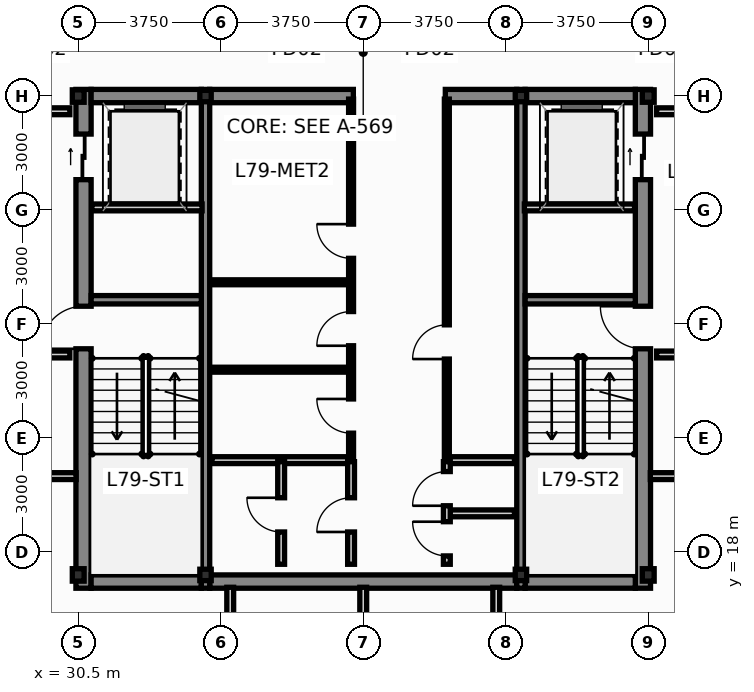
"""IFC4 building model, lengths in metres.
Left out: names, types, materials, properties, quantities, classifications, styles, units other than length and angle.
Written with IfcOpenShell. Run it as: python <this file> out.ifc"""

import sys

from ifc_helpers import new_model, si_unit, direction, frame, frame_2d, origin, origin_2d, place, context, subcontext, project, spatial, rectangle, hollow_rectangle, i_section, extrude, source, transform, mapped, element, fill, save


model = new_model("IFC4")
c1 = context("Model", 3, precision=1e-05, world=origin(), true_north=direction((0.0, 1.0)))
c2 = subcontext(c1, "Body", "Model", "MODEL_VIEW")
j1 = project(units=[si_unit("LENGTHUNIT", "METRE"), si_unit("PLANEANGLEUNIT", "RADIAN")], contexts=[c1])
p1 = place(None, origin())
s1 = spatial("IfcSite", under=j1, at=p1, CompositionType="ELEMENT")
p2 = place(p1, origin())
s2 = spatial("IfcBuilding", under=s1, at=p2, CompositionType="ELEMENT")
p3 = place(p2, frame((0.0, 0.0, 300.0)))
s3 = spatial("IfcBuildingStorey", under=s2, at=p3, CompositionType="ELEMENT", Elevation=300.0)
m1 = source(origin(), c2, "Body", "SweptSolid", [
    extrude(i_section(OverallWidth=0.311, OverallDepth=0.327, WebThickness=0.016, FlangeThickness=0.025, at=origin_2d()), origin(), (0.0, 0.0, 1.0), 3.4),
])
for number, where, z_axis, x_axis in (
    (1, (30.5, 17.4, 0.0), (0.0, 0.0, 1.0), (1.0, 0.0, 0.0)),
    (2, (45.5, 17.4, 0.0), (0.0, 0.0, 1.0), (1.0, 0.0, 0.0)),
    (3, (45.5, 30.0, 0.0), (0.0, 0.0, 1.0), (1.0, 0.0, 0.0)),
    (4, (30.5, 30.0, 0.0), (0.0, 0.0, 1.0), (1.0, 0.0, 0.0)),
):
    element("IfcColumn", number, at=place(p3, frame(where, z_axis=z_axis, x_axis=x_axis)), inside=s3, PredefinedType="COLUMN", context=c2, shape_type="MappedRepresentation", body=[
        mapped(m1, transform((0.0, 0.0, 0.0), scale=1.0)),
    ])
m2 = source(origin(), c2, "Body", "SweptSolid", [
    extrude(hollow_rectangle(XDim=0.3, YDim=0.3, WallThickness=0.012, at=origin_2d()), origin(), (0.0, 0.0, 1.0), 3.4),
])
for number, where, z_axis, x_axis in (
    (5, (33.85, 17.4, 0.0), (0.0, 0.0, 1.0), (1.0, 0.0, 0.0)),
    (6, (42.15, 17.4, 0.0), (0.0, 0.0, 1.0), (1.0, 0.0, 0.0)),
    (7, (33.85, 30.0, 0.0), (0.0, 0.0, 1.0), (1.0, 0.0, 0.0)),
    (8, (42.15, 30.0, 0.0), (0.0, 0.0, 1.0), (1.0, 0.0, 0.0)),
):
    element("IfcColumn", number, at=place(p3, frame(where, z_axis=z_axis, x_axis=x_axis)), inside=s3, PredefinedType="COLUMN", context=c2, shape_type="MappedRepresentation", body=[
        mapped(m2, transform((0.0, 0.0, 0.0), scale=1.0)),
    ])
p4 = place(p3, frame((30.64, 17.05, 0.0), z_axis=(0.0, 0.0, 1.0), x_axis=(0.0, 1.0, 0.0)))
e9 = element("IfcWall", 9, at=p4, inside=s3, PredefinedType="SHEAR", context=c2, shape_type="SweptSolid", body=[
    extrude(rectangle(XDim=13.125, YDim=0.4, at=frame_2d((6.562, 0.0))), origin(), (0.0, 0.0, 1.0), 3.4),
])
p5 = place(p4, frame((6.3, 0.0, 0.0)))
e10 = element("IfcOpeningElement", 10, at=p5, cuts=e9, PredefinedType="OPENING", context=c2, shape_type="SweptSolid", body=[
    extrude(rectangle(XDim=1.12, YDim=2.15, at=frame_2d((0.56, 1.075))), frame((0.0, 0.212, 0.0), z_axis=(0.0, -1.0, 0.0), x_axis=(1.0, 0.0, 0.0)), (0.0, 0.0, 1.0), 0.424),
])
p6 = place(p4, frame((10.75, 0.0, 0.0)))
e11 = element("IfcOpeningElement", 11, at=p6, cuts=e9, PredefinedType="OPENING", context=c2, shape_type="SweptSolid", body=[
    extrude(rectangle(XDim=1.2, YDim=2.2, at=frame_2d((0.6, 1.1))), frame((0.0, 0.212, 0.0), z_axis=(0.0, -1.0, 0.0), x_axis=(1.0, 0.0, 0.0)), (0.0, 0.0, 1.0), 0.424),
])
p7 = place(p3, frame((45.36, 17.05, 0.0), z_axis=(0.0, 0.0, 1.0), x_axis=(0.0, 1.0, 0.0)))
e12 = element("IfcWall", 12, at=p7, inside=s3, PredefinedType="SHEAR", context=c2, shape_type="SweptSolid", body=[
    extrude(rectangle(XDim=13.125, YDim=0.4, at=frame_2d((6.562, 0.0))), origin(), (0.0, 0.0, 1.0), 3.4),
])
p8 = place(p7, frame((6.3, 0.0, 0.0)))
e13 = element("IfcOpeningElement", 13, at=p8, cuts=e12, PredefinedType="OPENING", context=c2, shape_type="SweptSolid", body=[
    extrude(rectangle(XDim=1.12, YDim=2.15, at=frame_2d((0.56, 1.075))), frame((0.0, 0.212, 0.0), z_axis=(0.0, -1.0, 0.0), x_axis=(1.0, 0.0, 0.0)), (0.0, 0.0, 1.0), 0.424),
])
p9 = place(p7, frame((10.75, 0.0, 0.0)))
e14 = element("IfcOpeningElement", 14, at=p9, cuts=e12, PredefinedType="OPENING", context=c2, shape_type="SweptSolid", body=[
    extrude(rectangle(XDim=1.2, YDim=2.2, at=frame_2d((0.6, 1.1))), frame((0.0, 0.212, 0.0), z_axis=(0.0, -1.0, 0.0), x_axis=(1.0, 0.0, 0.0)), (0.0, 0.0, 1.0), 0.424),
])
p10 = place(p3, frame((30.84, 17.225, 0.0), z_axis=(0.0, 0.0, 1.0), x_axis=(1.0, 0.0, 0.0)))
e15 = element("IfcWall", 15, at=p10, inside=s3, PredefinedType="SHEAR", context=c2, shape_type="SweptSolid", body=[
    extrude(rectangle(XDim=2.9, YDim=0.35, at=frame_2d((1.45, 0.0))), origin(), (0.0, 0.0, 1.0), 3.4),
])
p11 = place(p3, frame((33.96, 17.225, 0.0), z_axis=(0.0, 0.0, 1.0), x_axis=(1.0, 0.0, 0.0)))
e16 = element("IfcWall", 16, at=p11, inside=s3, PredefinedType="SHEAR", context=c2, shape_type="SweptSolid", body=[
    extrude(rectangle(XDim=8.08, YDim=0.35, at=frame_2d((4.04, 0.0))), origin(), (0.0, 0.0, 1.0), 3.4),
])
for number, where, z_axis, x_axis in (
    (17, (42.26, 17.225, 0.0), (0.0, 0.0, 1.0), (1.0, 0.0, 0.0)),
    (18, (30.84, 30.0, 0.0), (0.0, 0.0, 1.0), (1.0, 0.0, 0.0)),
):
    element("IfcWall", number, at=place(p3, frame(where, z_axis=z_axis, x_axis=x_axis)), inside=s3, PredefinedType="SHEAR", context=c2, shape_type="SweptSolid", body=[
        extrude(rectangle(XDim=2.9, YDim=0.35, at=frame_2d((1.45, 0.0))), origin(), (0.0, 0.0, 1.0), 3.4),
    ])
p12 = place(p3, frame((33.96, 30.0, 0.0), z_axis=(0.0, 0.0, 1.0), x_axis=(1.0, 0.0, 0.0)))
e19 = element("IfcWall", 19, at=p12, inside=s3, PredefinedType="SHEAR", context=c2, shape_type="SweptSolid", body=[
    extrude(rectangle(XDim=3.78, YDim=0.35, at=frame_2d((1.89, 0.0))), origin(), (0.0, 0.0, 1.0), 3.4),
])
p13 = place(p3, frame((40.16, 30.0, 0.0), z_axis=(0.0, 0.0, 1.0), x_axis=(1.0, 0.0, 0.0)))
e20 = element("IfcWall", 20, at=p13, inside=s3, PredefinedType="SHEAR", context=c2, shape_type="SweptSolid", body=[
    extrude(rectangle(XDim=1.88, YDim=0.35, at=frame_2d((0.94, 0.0))), origin(), (0.0, 0.0, 1.0), 3.4),
])
p14 = place(p3, frame((42.26, 30.0, 0.0), z_axis=(0.0, 0.0, 1.0), x_axis=(1.0, 0.0, 0.0)))
e21 = element("IfcWall", 21, at=p14, inside=s3, PredefinedType="SHEAR", context=c2, shape_type="SweptSolid", body=[
    extrude(rectangle(XDim=2.9, YDim=0.35, at=frame_2d((1.45, 0.0))), origin(), (0.0, 0.0, 1.0), 3.4),
])
for number, where, z_axis, x_axis in (
    (22, (33.85, 17.05, 0.0), (0.0, 0.0, 1.0), (0.0, 1.0, 0.0)),
    (23, (42.15, 17.05, 0.0), (0.0, 0.0, 1.0), (0.0, 1.0, 0.0)),
):
    element("IfcWall", number, at=place(p3, frame(where, z_axis=z_axis, x_axis=x_axis)), inside=s3, PredefinedType="SHEAR", context=c2, shape_type="SweptSolid", body=[
        extrude(rectangle(XDim=13.125, YDim=0.22, at=frame_2d((6.562, 0.0))), origin(), (0.0, 0.0, 1.0), 3.4),
    ])
for number, where, z_axis, x_axis in (
    (24, (30.84, 24.64, 0.0), (0.0, 0.0, 1.0), (1.0, 0.0, 0.0)),
    (25, (42.26, 24.64, 0.0), (0.0, 0.0, 1.0), (1.0, 0.0, 0.0)),
):
    element("IfcWall", number, at=place(p3, frame(where, z_axis=z_axis, x_axis=x_axis)), inside=s3, PredefinedType="SHEAR", context=c2, shape_type="SweptSolid", body=[
        extrude(rectangle(XDim=2.9, YDim=0.22, at=frame_2d((1.45, 0.0))), origin(), (0.0, 0.0, 1.0), 3.4),
    ])
for number, where, z_axis, x_axis in (
    (26, (27.52, 23.2, 0.0), (0.0, 0.0, 1.0), (1.0, 0.0, 0.0)),
    (27, (27.52, 29.6, 0.0), (0.0, 0.0, 1.0), (1.0, 0.0, 0.0)),
    (28, (45.72, 23.2, 0.0), (0.0, 0.0, 1.0), (1.0, 0.0, 0.0)),
    (29, (45.72, 29.6, 0.0), (0.0, 0.0, 1.0), (1.0, 0.0, 0.0)),
):
    element("IfcWall", number, at=place(p3, frame(where, z_axis=z_axis, x_axis=x_axis)), inside=s3, PredefinedType="PARTITIONING", context=c2, shape_type="SweptSolid", body=[
        extrude(rectangle(XDim=2.76, YDim=0.18, at=frame_2d((1.38, 0.0))), origin(), (0.0, 0.0, 1.0), 3.15),
    ])
for number, where, z_axis, x_axis in (
    (30, (30.86, 27.07, 0.0), (0.0, 0.0, 1.0), (1.0, 0.0, 0.0)),
    (31, (42.24, 27.07, 0.0), (0.0, 0.0, 1.0), (1.0, 0.0, 0.0)),
):
    element("IfcWall", number, at=place(p3, frame(where, z_axis=z_axis, x_axis=x_axis)), inside=s3, PredefinedType="PARTITIONING", context=c2, shape_type="SweptSolid", body=[
        extrude(rectangle(XDim=2.9, YDim=0.18, at=frame_2d((1.45, 0.0))), origin(), (0.0, 0.0, 1.0), 3.15),
    ])
p15 = place(p3, frame((34.02, 20.42, 0.0), z_axis=(0.0, 0.0, 1.0), x_axis=(1.0, 0.0, 0.0)))
e32 = element("IfcWall", 32, at=p15, inside=s3, PredefinedType="PARTITIONING", context=c2, shape_type="SweptSolid", body=[
    extrude(rectangle(XDim=3.64, YDim=0.18, at=frame_2d((1.82, 0.0))), origin(), (0.0, 0.0, 1.0), 3.15),
])
p16 = place(p3, frame((40.22, 20.42, 0.0), z_axis=(0.0, 0.0, 1.0), x_axis=(1.0, 0.0, 0.0)))
e33 = element("IfcWall", 33, at=p16, inside=s3, PredefinedType="PARTITIONING", context=c2, shape_type="SweptSolid", body=[
    extrude(rectangle(XDim=1.76, YDim=0.18, at=frame_2d((0.88, 0.0))), origin(), (0.0, 0.0, 1.0), 3.15),
])
for number, where, z_axis, x_axis in (
    (34, (34.02, 22.8, 0.0), (0.0, 0.0, 1.0), (1.0, 0.0, 0.0)),
    (35, (34.02, 25.1, 0.0), (0.0, 0.0, 1.0), (1.0, 0.0, 0.0)),
):
    element("IfcWall", number, at=place(p3, frame(where, z_axis=z_axis, x_axis=x_axis)), inside=s3, PredefinedType="PARTITIONING", context=c2, shape_type="SweptSolid", body=[
        extrude(rectangle(XDim=3.58, YDim=0.13, at=frame_2d((1.79, 0.0))), origin(), (0.0, 0.0, 1.0), 3.15),
    ])
p17 = place(p3, frame((37.68, 20.48, 0.0), z_axis=(0.0, 0.0, 1.0), x_axis=(0.0, 1.0, 0.0)))
e36 = element("IfcWall", 36, at=p17, inside=s3, PredefinedType="PARTITIONING", context=c2, shape_type="SweptSolid", body=[
    extrude(rectangle(XDim=9.44, YDim=0.13, at=frame_2d((4.72, 0.0))), origin(), (0.0, 0.0, 1.0), 3.15),
])
p18 = place(p17, frame((0.65, 0.0, 0.0)))
e37 = element("IfcOpeningElement", 37, at=p18, cuts=e36, PredefinedType="OPENING", context=c2, shape_type="SweptSolid", body=[
    extrude(rectangle(XDim=0.9, YDim=2.1, at=frame_2d((0.45, 1.05))), frame((0.0, 0.077, 0.0), z_axis=(0.0, -1.0, 0.0), x_axis=(1.0, 0.0, 0.0)), (0.0, 0.0, 1.0), 0.154),
])
p19 = place(p17, frame((2.95, 0.0, 0.0)))
e38 = element("IfcOpeningElement", 38, at=p19, cuts=e36, PredefinedType="OPENING", context=c2, shape_type="SweptSolid", body=[
    extrude(rectangle(XDim=0.9, YDim=2.1, at=frame_2d((0.45, 1.05))), frame((0.0, 0.077, 0.0), z_axis=(0.0, -1.0, 0.0), x_axis=(1.0, 0.0, 0.0)), (0.0, 0.0, 1.0), 0.154),
])
p20 = place(p17, frame((5.25, 0.0, 0.0)))
e39 = element("IfcOpeningElement", 39, at=p20, cuts=e36, PredefinedType="OPENING", context=c2, shape_type="SweptSolid", body=[
    extrude(rectangle(XDim=0.9, YDim=2.1, at=frame_2d((0.45, 1.05))), frame((0.0, 0.077, 0.0), z_axis=(0.0, -1.0, 0.0), x_axis=(1.0, 0.0, 0.0)), (0.0, 0.0, 1.0), 0.154),
])
p21 = place(p3, frame((40.2, 20.48, 0.0), z_axis=(0.0, 0.0, 1.0), x_axis=(0.0, 1.0, 0.0)))
e40 = element("IfcWall", 40, at=p21, inside=s3, PredefinedType="PARTITIONING", context=c2, shape_type="SweptSolid", body=[
    extrude(rectangle(XDim=9.44, YDim=0.13, at=frame_2d((4.72, 0.0))), origin(), (0.0, 0.0, 1.0), 3.15),
])
p22 = place(p21, frame((2.6, 0.0, 0.0)))
e41 = element("IfcOpeningElement", 41, at=p22, cuts=e40, PredefinedType="OPENING", context=c2, shape_type="SweptSolid", body=[
    extrude(rectangle(XDim=0.9, YDim=2.1, at=frame_2d((0.45, 1.05))), frame((0.0, 0.077, 0.0), z_axis=(0.0, -1.0, 0.0), x_axis=(1.0, 0.0, 0.0)), (0.0, 0.0, 1.0), 0.154),
])
p23 = place(p3, frame((35.84, 17.68, 0.0), z_axis=(0.0, 0.0, 1.0), x_axis=(0.0, 1.0, 0.0)))
e42 = element("IfcWall", 42, at=p23, inside=s3, PredefinedType="PARTITIONING", context=c2, shape_type="SweptSolid", body=[
    extrude(rectangle(XDim=2.7, YDim=0.18, at=frame_2d((1.35, 0.0))), origin(), (0.0, 0.0, 1.0), 3.15),
])
p24 = place(p23, frame((0.85, 0.0, 0.0)))
e43 = element("IfcOpeningElement", 43, at=p24, cuts=e42, PredefinedType="OPENING", context=c2, shape_type="SweptSolid", body=[
    extrude(rectangle(XDim=0.9, YDim=2.1, at=frame_2d((0.45, 1.05))), frame((0.0, 0.102, 0.0), z_axis=(0.0, -1.0, 0.0), x_axis=(1.0, 0.0, 0.0)), (0.0, 0.0, 1.0), 0.204),
])
p25 = place(p3, frame((37.68, 17.68, 0.0), z_axis=(0.0, 0.0, 1.0), x_axis=(0.0, 1.0, 0.0)))
e44 = element("IfcWall", 44, at=p25, inside=s3, PredefinedType="PARTITIONING", context=c2, shape_type="SweptSolid", body=[
    extrude(rectangle(XDim=2.7, YDim=0.18, at=frame_2d((1.35, 0.0))), origin(), (0.0, 0.0, 1.0), 3.15),
])
p26 = place(p25, frame((0.85, 0.0, 0.0)))
e45 = element("IfcOpeningElement", 45, at=p26, cuts=e44, PredefinedType="OPENING", context=c2, shape_type="SweptSolid", body=[
    extrude(rectangle(XDim=0.9, YDim=2.1, at=frame_2d((0.45, 1.05))), frame((0.0, 0.102, 0.0), z_axis=(0.0, -1.0, 0.0), x_axis=(1.0, 0.0, 0.0)), (0.0, 0.0, 1.0), 0.204),
])
p27 = place(p3, frame((40.28, 19.02, 0.0), z_axis=(0.0, 0.0, 1.0), x_axis=(1.0, 0.0, 0.0)))
e46 = element("IfcWall", 46, at=p27, inside=s3, PredefinedType="PARTITIONING", context=c2, shape_type="SweptSolid", body=[
    extrude(rectangle(XDim=1.7, YDim=0.18, at=frame_2d((0.85, 0.0))), origin(), (0.0, 0.0, 1.0), 3.15),
])
p28 = place(p3, frame((40.2, 17.68, 0.0), z_axis=(0.0, 0.0, 1.0), x_axis=(0.0, 1.0, 0.0)))
e47 = element("IfcWall", 47, at=p28, inside=s3, PredefinedType="PARTITIONING", context=c2, shape_type="SweptSolid", body=[
    extrude(rectangle(XDim=2.7, YDim=0.18, at=frame_2d((1.35, 0.0))), origin(), (0.0, 0.0, 1.0), 3.15),
])
p29 = place(p28, frame((0.22, 0.0, 0.0)))
e48 = element("IfcOpeningElement", 48, at=p29, cuts=e47, PredefinedType="OPENING", context=c2, shape_type="SweptSolid", body=[
    extrude(rectangle(XDim=0.9, YDim=2.1, at=frame_2d((0.45, 1.05))), frame((0.0, 0.102, 0.0), z_axis=(0.0, -1.0, 0.0), x_axis=(1.0, 0.0, 0.0)), (0.0, 0.0, 1.0), 0.204),
])
p30 = place(p28, frame((1.54, 0.0, 0.0)))
e49 = element("IfcOpeningElement", 49, at=p30, cuts=e47, PredefinedType="OPENING", context=c2, shape_type="SweptSolid", body=[
    extrude(rectangle(XDim=0.9, YDim=2.1, at=frame_2d((0.45, 1.05))), frame((0.0, 0.102, 0.0), z_axis=(0.0, -1.0, 0.0), x_axis=(1.0, 0.0, 0.0)), (0.0, 0.0, 1.0), 0.204),
])
p31 = place(p3, frame((17.83, 20.0, 0.0), z_axis=(0.0, 0.0, 1.0), x_axis=(1.0, 0.0, 0.0)))
e50 = element("IfcWall", 50, at=p31, inside=s3, PredefinedType="PARTITIONING", context=c2, shape_type="SweptSolid", body=[
    extrude(rectangle(XDim=12.615, YDim=0.18, at=frame_2d((6.308, 0.0))), origin(), (0.0, 0.0, 1.0), 3.15),
])
p32 = place(p31, frame((5.783, 0.0, 0.0)))
e51 = element("IfcOpeningElement", 51, at=p32, cuts=e50, PredefinedType="OPENING", context=c2, shape_type="SweptSolid", body=[
    extrude(rectangle(XDim=1.05, YDim=2.15, at=frame_2d((0.525, 1.075))), frame((0.0, 0.102, 0.0), z_axis=(0.0, -1.0, 0.0), x_axis=(1.0, 0.0, 0.0)), (0.0, 0.0, 1.0), 0.204),
])
p33 = place(p3, frame((45.555, 20.0, 0.0), z_axis=(0.0, 0.0, 1.0), x_axis=(1.0, 0.0, 0.0)))
e52 = element("IfcWall", 52, at=p33, inside=s3, PredefinedType="PARTITIONING", context=c2, shape_type="SweptSolid", body=[
    extrude(rectangle(XDim=11.485, YDim=0.18, at=frame_2d((5.743, 0.0))), origin(), (0.0, 0.0, 1.0), 3.15),
])
p34 = place(p33, frame((5.217, 0.0, 0.0)))
e53 = element("IfcOpeningElement", 53, at=p34, cuts=e52, PredefinedType="OPENING", context=c2, shape_type="SweptSolid", body=[
    extrude(rectangle(XDim=1.05, YDim=2.15, at=frame_2d((0.525, 1.075))), frame((0.0, 0.102, 0.0), z_axis=(0.0, -1.0, 0.0), x_axis=(1.0, 0.0, 0.0)), (0.0, 0.0, 1.0), 0.204),
])
p35 = place(p3, frame((34.5, 8.98, 0.0), z_axis=(0.0, 0.0, 1.0), x_axis=(0.0, 1.0, 0.0)))
e54 = element("IfcWall", 54, at=p35, inside=s3, PredefinedType="PARTITIONING", context=c2, shape_type="SweptSolid", body=[
    extrude(rectangle(XDim=8.095, YDim=0.18, at=frame_2d((4.047, 0.0))), origin(), (0.0, 0.0, 1.0), 3.15),
])
p36 = place(p35, frame((3.522, 0.0, 0.0)))
e55 = element("IfcOpeningElement", 55, at=p36, cuts=e54, PredefinedType="OPENING", context=c2, shape_type="SweptSolid", body=[
    extrude(rectangle(XDim=1.05, YDim=2.15, at=frame_2d((0.525, 1.075))), frame((0.0, 0.102, 0.0), z_axis=(0.0, -1.0, 0.0), x_axis=(1.0, 0.0, 0.0)), (0.0, 0.0, 1.0), 0.204),
])
p37 = place(p3, frame((38.0, 9.07, 0.0), z_axis=(0.0, 0.0, 1.0), x_axis=(0.0, 1.0, 0.0)))
e56 = element("IfcWall", 56, at=p37, inside=s3, PredefinedType="PARTITIONING", context=c2, shape_type="SweptSolid", body=[
    extrude(rectangle(XDim=8.005, YDim=0.18, at=frame_2d((4.002, 0.0))), origin(), (0.0, 0.0, 1.0), 3.15),
])
p38 = place(p37, frame((3.477, 0.0, 0.0)))
e57 = element("IfcOpeningElement", 57, at=p38, cuts=e56, PredefinedType="OPENING", context=c2, shape_type="SweptSolid", body=[
    extrude(rectangle(XDim=1.05, YDim=2.15, at=frame_2d((0.525, 1.075))), frame((0.0, 0.102, 0.0), z_axis=(0.0, -1.0, 0.0), x_axis=(1.0, 0.0, 0.0)), (0.0, 0.0, 1.0), 0.204),
])
p39 = place(p3, frame((41.5, 9.15, 0.0), z_axis=(0.0, 0.0, 1.0), x_axis=(0.0, 1.0, 0.0)))
e58 = element("IfcWall", 58, at=p39, inside=s3, PredefinedType="PARTITIONING", context=c2, shape_type="SweptSolid", body=[
    extrude(rectangle(XDim=7.925, YDim=0.18, at=frame_2d((3.962, 0.0))), origin(), (0.0, 0.0, 1.0), 3.15),
])
p40 = place(p5, origin())
e59 = element("IfcDoor", 59, at=p40, inside=s3, OperationType="SINGLE_SWING_LEFT", PredefinedType="DOOR", context=c2, shape_type="SweptSolid", body=[
    extrude(rectangle(XDim=1.12, YDim=2.15, at=frame_2d((0.56, 1.075))), frame((0.0, 0.025, 0.0), z_axis=(0.0, -1.0, 0.0), x_axis=(1.0, 0.0, 0.0)), (0.0, 0.0, 1.0), 0.05),
])
fill(e10, e59)
p41 = place(p6, origin())
e60 = element("IfcDoor", 60, at=p41, inside=s3, OperationType="SLIDING_TO_LEFT", PredefinedType="DOOR", context=c2, shape_type="SweptSolid", body=[
    extrude(rectangle(XDim=1.2, YDim=2.2, at=frame_2d((0.6, 1.1))), frame((0.0, 0.025, 0.0), z_axis=(0.0, -1.0, 0.0), x_axis=(1.0, 0.0, 0.0)), (0.0, 0.0, 1.0), 0.05),
])
fill(e11, e60)
p42 = place(p8, origin())
e61 = element("IfcDoor", 61, at=p42, inside=s3, OperationType="SINGLE_SWING_RIGHT", PredefinedType="DOOR", context=c2, shape_type="SweptSolid", body=[
    extrude(rectangle(XDim=1.12, YDim=2.15, at=frame_2d((0.56, 1.075))), frame((0.0, 0.025, 0.0), z_axis=(0.0, -1.0, 0.0), x_axis=(1.0, 0.0, 0.0)), (0.0, 0.0, 1.0), 0.05),
])
fill(e13, e61)
p43 = place(p9, origin())
e62 = element("IfcDoor", 62, at=p43, inside=s3, OperationType="SLIDING_TO_RIGHT", PredefinedType="DOOR", context=c2, shape_type="SweptSolid", body=[
    extrude(rectangle(XDim=1.2, YDim=2.2, at=frame_2d((0.6, 1.1))), frame((0.0, 0.025, 0.0), z_axis=(0.0, -1.0, 0.0), x_axis=(1.0, 0.0, 0.0)), (0.0, 0.0, 1.0), 0.05),
])
fill(e14, e62)
p44 = place(p18, origin())
e63 = element("IfcDoor", 63, at=p44, inside=s3, OperationType="SINGLE_SWING_RIGHT", PredefinedType="DOOR", context=c2, shape_type="SweptSolid", body=[
    extrude(rectangle(XDim=0.9, YDim=2.1, at=frame_2d((0.45, 1.05))), frame((0.0, 0.025, 0.0), z_axis=(0.0, -1.0, 0.0), x_axis=(1.0, 0.0, 0.0)), (0.0, 0.0, 1.0), 0.05),
])
fill(e37, e63)
p45 = place(p19, origin())
e64 = element("IfcDoor", 64, at=p45, inside=s3, OperationType="SINGLE_SWING_LEFT", PredefinedType="DOOR", context=c2, shape_type="SweptSolid", body=[
    extrude(rectangle(XDim=0.9, YDim=2.1, at=frame_2d((0.45, 1.05))), frame((0.0, 0.025, 0.0), z_axis=(0.0, -1.0, 0.0), x_axis=(1.0, 0.0, 0.0)), (0.0, 0.0, 1.0), 0.05),
])
fill(e38, e64)
p46 = place(p20, origin())
e65 = element("IfcDoor", 65, at=p46, inside=s3, OperationType="SINGLE_SWING_RIGHT", PredefinedType="DOOR", context=c2, shape_type="SweptSolid", body=[
    extrude(rectangle(XDim=0.9, YDim=2.1, at=frame_2d((0.45, 1.05))), frame((0.0, 0.025, 0.0), z_axis=(0.0, -1.0, 0.0), x_axis=(1.0, 0.0, 0.0)), (0.0, 0.0, 1.0), 0.05),
])
fill(e39, e65)
p47 = place(p22, origin())
e66 = element("IfcDoor", 66, at=p47, inside=s3, OperationType="SINGLE_SWING_LEFT", PredefinedType="DOOR", context=c2, shape_type="SweptSolid", body=[
    extrude(rectangle(XDim=0.9, YDim=2.1, at=frame_2d((0.45, 1.05))), frame((0.0, 0.025, 0.0), z_axis=(0.0, -1.0, 0.0), x_axis=(1.0, 0.0, 0.0)), (0.0, 0.0, 1.0), 0.05),
])
fill(e41, e66)
p48 = place(p24, origin())
e67 = element("IfcDoor", 67, at=p48, inside=s3, OperationType="SINGLE_SWING_RIGHT", PredefinedType="DOOR", context=c2, shape_type="SweptSolid", body=[
    extrude(rectangle(XDim=0.9, YDim=2.1, at=frame_2d((0.45, 1.05))), frame((0.0, 0.025, 0.0), z_axis=(0.0, -1.0, 0.0), x_axis=(1.0, 0.0, 0.0)), (0.0, 0.0, 1.0), 0.05),
])
fill(e43, e67)
p49 = place(p26, origin())
e68 = element("IfcDoor", 68, at=p49, inside=s3, OperationType="SINGLE_SWING_LEFT", PredefinedType="DOOR", context=c2, shape_type="SweptSolid", body=[
    extrude(rectangle(XDim=0.9, YDim=2.1, at=frame_2d((0.45, 1.05))), frame((0.0, 0.025, 0.0), z_axis=(0.0, -1.0, 0.0), x_axis=(1.0, 0.0, 0.0)), (0.0, 0.0, 1.0), 0.05),
])
fill(e45, e68)
p50 = place(p29, origin())
e69 = element("IfcDoor", 69, at=p50, inside=s3, OperationType="SINGLE_SWING_RIGHT", PredefinedType="DOOR", context=c2, shape_type="SweptSolid", body=[
    extrude(rectangle(XDim=0.9, YDim=2.1, at=frame_2d((0.45, 1.05))), frame((0.0, 0.025, 0.0), z_axis=(0.0, -1.0, 0.0), x_axis=(1.0, 0.0, 0.0)), (0.0, 0.0, 1.0), 0.05),
])
fill(e48, e69)
p51 = place(p30, origin())
e70 = element("IfcDoor", 70, at=p51, inside=s3, OperationType="SINGLE_SWING_LEFT", PredefinedType="DOOR", context=c2, shape_type="SweptSolid", body=[
    extrude(rectangle(XDim=0.9, YDim=2.1, at=frame_2d((0.45, 1.05))), frame((0.0, 0.025, 0.0), z_axis=(0.0, -1.0, 0.0), x_axis=(1.0, 0.0, 0.0)), (0.0, 0.0, 1.0), 0.05),
])
fill(e49, e70)
save(model, sys.argv[1])
